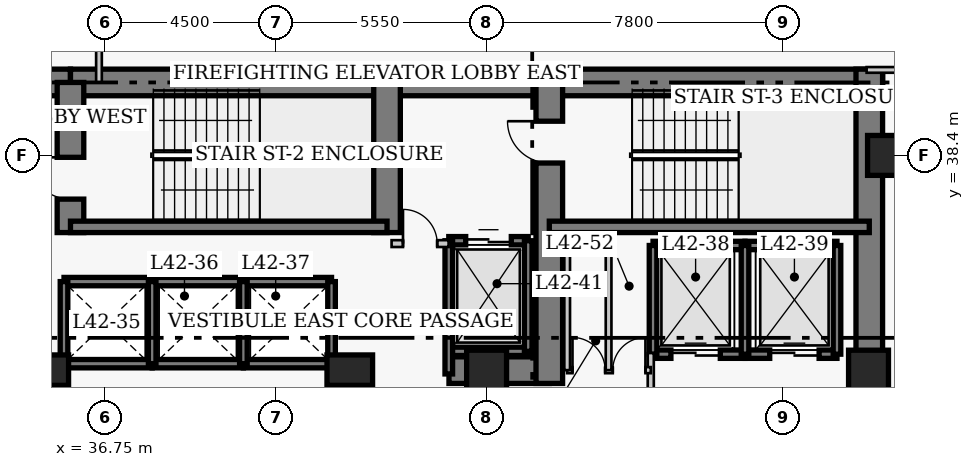
"""IFC4 building model, lengths in metres.
Left out: names, types, materials, properties, quantities, classifications, styles, units other than length and angle.
Written with IfcOpenShell. Run it as: python <this file> out.ifc"""

import sys

from ifc_helpers import new_model, si_unit, direction, frame, frame_2d, origin, origin_2d, place, context, subcontext, project, spatial, rectangle, extrude, element, fill, save


model = new_model("IFC4")
c1 = context("Model", 3, precision=1e-05, world=origin(), true_north=direction((0.0, 1.0)))
c2 = subcontext(c1, "Body", "Model", "MODEL_VIEW")
j1 = project(units=[si_unit("LENGTHUNIT", "METRE"), si_unit("PLANEANGLEUNIT", "RADIAN")], contexts=[c1])
p1 = place(None, origin())
s1 = spatial("IfcSite", under=j1, at=p1, CompositionType="ELEMENT")
p2 = place(p1, origin())
s2 = spatial("IfcBuilding", under=s1, at=p2, CompositionType="ELEMENT")
p3 = place(p2, frame((0.0, 0.0, 168.8)))
s3 = spatial("IfcBuildingStorey", under=s2, at=p3, CompositionType="ELEMENT", Elevation=168.8)
p4 = place(p3, frame((21.55, 40.32, 0.0), z_axis=(0.0, 0.0, 1.0), x_axis=(1.0, 0.0, 0.0)))
e1 = element("IfcWall", 1, at=p4, inside=s3, PredefinedType="SHEAR", context=c2, shape_type="SweptSolid", body=[
    extrude(rectangle(XDim=14.3, YDim=0.7, at=frame_2d((7.15, 0.0))), origin(), (0.0, 0.0, 1.0), 3.8),
])
p5 = place(p3, frame((35.85, 40.32, 0.0), z_axis=(0.0, 0.0, 1.0), x_axis=(1.0, 0.0, 0.0)))
e2 = element("IfcWall", 2, at=p5, inside=s3, PredefinedType="SHEAR", context=c2, shape_type="SweptSolid", body=[
    extrude(rectangle(XDim=12.6, YDim=0.7, at=frame_2d((6.3, 0.0))), origin(), (0.0, 0.0, 1.0), 3.8),
])
p6 = place(p3, frame((48.45, 40.32, 0.0), z_axis=(0.0, 0.0, 1.0), x_axis=(1.0, 0.0, 0.0)))
e3 = element("IfcWall", 3, at=p6, inside=s3, PredefinedType="SHEAR", context=c2, shape_type="SweptSolid", body=[
    extrude(rectangle(XDim=8.77, YDim=0.7, at=frame_2d((4.385, 0.0))), origin(), (0.0, 0.0, 1.0), 3.8),
])
p7 = place(p3, frame((56.87, 27.05, 0.0), z_axis=(0.0, 0.0, 1.0), x_axis=(0.0, 1.0, 0.0)))
e4 = element("IfcWall", 4, at=p7, inside=s3, PredefinedType="SHEAR", context=c2, shape_type="SweptSolid", body=[
    extrude(rectangle(XDim=13.62, YDim=0.7, at=frame_2d((6.81, 0.0))), origin(), (0.0, 0.0, 1.0), 3.8),
])
p8 = place(p3, frame((45.81, 32.75, 0.0), z_axis=(0.0, 0.0, 1.0), x_axis=(1.0, 0.0, 0.0)))
e5 = element("IfcWall", 5, at=p8, inside=s3, PredefinedType="SHEAR", context=c2, shape_type="SweptSolid", body=[
    extrude(rectangle(XDim=2.64, YDim=0.7, at=frame_2d((1.32, 0.0))), origin(), (0.0, 0.0, 1.0), 3.8),
])
p9 = place(p3, frame((35.85, 36.37, 0.0), z_axis=(0.0, 0.0, 1.0), x_axis=(0.0, 1.0, 0.0)))
e6 = element("IfcWall", 6, at=p9, inside=s3, PredefinedType="SHEAR", context=c2, shape_type="SweptSolid", body=[
    extrude(rectangle(XDim=3.95, YDim=0.7, at=frame_2d((1.975, 0.0))), origin(), (0.0, 0.0, 1.0), 3.8),
])
p10 = place(p9, frame((0.88, 0.0, 0.0)))
e7 = element("IfcOpeningElement", 7, at=p10, cuts=e6, PredefinedType="OPENING", context=c2, shape_type="SweptSolid", body=[
    extrude(rectangle(XDim=1.1, YDim=2.15, at=frame_2d((0.55, 1.075))), frame((0.0, 0.36, 0.0), z_axis=(0.0, -1.0, 0.0), x_axis=(1.0, 0.0, 0.0)), (0.0, 0.0, 1.0), 0.72),
])
p11 = place(p3, frame((44.18, 36.37, 0.0), z_axis=(0.0, 0.0, 1.0), x_axis=(0.0, 1.0, 0.0)))
e8 = element("IfcWall", 8, at=p11, inside=s3, PredefinedType="SHEAR", context=c2, shape_type="SweptSolid", body=[
    extrude(rectangle(XDim=3.95, YDim=0.7, at=frame_2d((1.975, 0.0))), origin(), (0.0, 0.0, 1.0), 3.8),
])
p12 = place(p3, frame((48.45, 32.4, 0.0), z_axis=(0.0, 0.0, 1.0), x_axis=(0.0, 1.0, 0.0)))
e9 = element("IfcWall", 9, at=p12, inside=s3, PredefinedType="SHEAR", context=c2, shape_type="SweptSolid", body=[
    extrude(rectangle(XDim=7.92, YDim=0.7, at=frame_2d((3.96, 0.0))), origin(), (0.0, 0.0, 1.0), 3.8),
])
p13 = place(p12, frame((5.8, 0.0, 0.0)))
e10 = element("IfcOpeningElement", 10, at=p13, cuts=e9, PredefinedType="OPENING", context=c2, shape_type="SweptSolid", body=[
    extrude(rectangle(XDim=1.1, YDim=2.15, at=frame_2d((0.55, 1.075))), frame((0.0, 0.36, 0.0), z_axis=(0.0, -1.0, 0.0), x_axis=(1.0, 0.0, 0.0)), (0.0, 0.0, 1.0), 0.72),
])
p14 = place(p3, frame((35.85, 36.52, 0.0), z_axis=(0.0, 0.0, 1.0), x_axis=(1.0, 0.0, 0.0)))
e11 = element("IfcWall", 11, at=p14, inside=s3, PredefinedType="SHEAR", context=c2, shape_type="SweptSolid", body=[
    extrude(rectangle(XDim=8.33, YDim=0.3, at=frame_2d((4.165, 0.0))), origin(), (0.0, 0.0, 1.0), 3.8),
])
p15 = place(p3, frame((48.45, 36.52, 0.0), z_axis=(0.0, 0.0, 1.0), x_axis=(1.0, 0.0, 0.0)))
e12 = element("IfcWall", 12, at=p15, inside=s3, PredefinedType="SHEAR", context=c2, shape_type="SweptSolid", body=[
    extrude(rectangle(XDim=8.42, YDim=0.3, at=frame_2d((4.21, 0.0))), origin(), (0.0, 0.0, 1.0), 3.8),
])
p16 = place(p3, frame((57.35, 38.4, 0.0), z_axis=(0.0, 0.0, 1.0), x_axis=(1.0, 0.0, 0.0)))
e13 = element("IfcColumn", 13, at=p16, inside=s3, PredefinedType="COLUMN", context=c2, shape_type="SweptSolid", body=[
    extrude(rectangle(XDim=1.05, YDim=1.05, at=origin_2d()), origin(), (0.0, 0.0, 1.0), 3.8),
])
for number, where, z_axis, x_axis in (
    (14, (35.2, 32.75, 0.0), (0.0, 0.0, 1.0), (1.0, 0.0, 0.0)),
    (15, (43.2, 32.75, 0.0), (0.0, 0.0, 1.0), (1.0, 0.0, 0.0)),
):
    element("IfcColumn", number, at=place(p3, frame(where, z_axis=z_axis, x_axis=x_axis)), inside=s3, PredefinedType="COLUMN", context=c2, shape_type="SweptSolid", body=[
        extrude(rectangle(XDim=1.2, YDim=0.8, at=origin_2d()), origin(), (0.0, 0.0, 1.0), 3.8),
    ])
for number, where, z_axis, x_axis in (
    (16, (46.8, 32.75, 0.0), (0.0, 0.0, 1.0), (1.0, 0.0, 0.0)),
    (17, (56.85, 32.75, 0.0), (0.0, 0.0, 1.0), (1.0, 0.0, 0.0)),
):
    element("IfcColumn", number, at=place(p3, frame(where, z_axis=z_axis, x_axis=x_axis)), inside=s3, PredefinedType="COLUMN", context=c2, shape_type="SweptSolid", body=[
        extrude(rectangle(XDim=1.05, YDim=1.05, at=origin_2d()), origin(), (0.0, 0.0, 1.0), 3.8),
    ])
for number, where, z_axis, x_axis in (
    (18, (35.68, 35.08, 0.0), (0.0, 0.0, 1.0), (1.0, 0.0, 0.0)),
    (19, (35.68, 32.92, 0.0), (0.0, 0.0, 1.0), (1.0, 0.0, 0.0)),
):
    element("IfcWall", number, at=place(p3, frame(where, z_axis=z_axis, x_axis=x_axis)), inside=s3, PredefinedType="SHEAR", context=c2, shape_type="SweptSolid", body=[
        extrude(rectangle(XDim=2.32, YDim=0.22, at=frame_2d((1.16, 0.0))), origin(), (0.0, 0.0, 1.0), 3.8),
    ])
p17 = place(p3, frame((35.68, 32.92, 0.0), z_axis=(0.0, 0.0, 1.0), x_axis=(0.0, 1.0, 0.0)))
e20 = element("IfcWall", 20, at=p17, inside=s3, PredefinedType="SHEAR", context=c2, shape_type="SweptSolid", body=[
    extrude(rectangle(XDim=2.16, YDim=0.2, at=frame_2d((1.08, 0.0))), origin(), (0.0, 0.0, 1.0), 3.8),
])
for number, where, z_axis, x_axis in (
    (21, (38.0, 35.08, 0.0), (0.0, 0.0, 1.0), (1.0, 0.0, 0.0)),
    (22, (38.0, 32.92, 0.0), (0.0, 0.0, 1.0), (1.0, 0.0, 0.0)),
):
    element("IfcWall", number, at=place(p3, frame(where, z_axis=z_axis, x_axis=x_axis)), inside=s3, PredefinedType="SHEAR", context=c2, shape_type="SweptSolid", body=[
        extrude(rectangle(XDim=2.4, YDim=0.22, at=frame_2d((1.2, 0.0))), origin(), (0.0, 0.0, 1.0), 3.8),
    ])
p18 = place(p3, frame((38.0, 32.92, 0.0), z_axis=(0.0, 0.0, 1.0), x_axis=(0.0, 1.0, 0.0)))
e23 = element("IfcWall", 23, at=p18, inside=s3, PredefinedType="SHEAR", context=c2, shape_type="SweptSolid", body=[
    extrude(rectangle(XDim=2.16, YDim=0.2, at=frame_2d((1.08, 0.0))), origin(), (0.0, 0.0, 1.0), 3.8),
])
for number, where, z_axis, x_axis in (
    (24, (40.4, 35.08, 0.0), (0.0, 0.0, 1.0), (1.0, 0.0, 0.0)),
    (25, (40.4, 32.92, 0.0), (0.0, 0.0, 1.0), (1.0, 0.0, 0.0)),
):
    element("IfcWall", number, at=place(p3, frame(where, z_axis=z_axis, x_axis=x_axis)), inside=s3, PredefinedType="SHEAR", context=c2, shape_type="SweptSolid", body=[
        extrude(rectangle(XDim=2.32, YDim=0.22, at=frame_2d((1.16, 0.0))), origin(), (0.0, 0.0, 1.0), 3.8),
    ])
for number, where, z_axis, x_axis in (
    (26, (40.4, 32.92, 0.0), (0.0, 0.0, 1.0), (0.0, 1.0, 0.0)),
    (27, (42.72, 32.92, 0.0), (0.0, 0.0, 1.0), (0.0, 1.0, 0.0)),
):
    element("IfcWall", number, at=place(p3, frame(where, z_axis=z_axis, x_axis=x_axis)), inside=s3, PredefinedType="SHEAR", context=c2, shape_type="SweptSolid", body=[
        extrude(rectangle(XDim=2.16, YDim=0.2, at=frame_2d((1.08, 0.0))), origin(), (0.0, 0.0, 1.0), 3.8),
    ])
p19 = place(p3, frame((51.18, 36.03, 0.0), z_axis=(0.0, 0.0, 1.0), x_axis=(1.0, 0.0, 0.0)))
e28 = element("IfcWall", 28, at=p19, inside=s3, PredefinedType="SHEAR", context=c2, shape_type="SweptSolid", body=[
    extrude(rectangle(XDim=2.42, YDim=0.22, at=frame_2d((1.21, 0.0))), origin(), (0.0, 0.0, 1.0), 3.8),
])
p20 = place(p3, frame((51.18, 33.17, 0.0), z_axis=(0.0, 0.0, 1.0), x_axis=(1.0, 0.0, 0.0)))
e29 = element("IfcWall", 29, at=p20, inside=s3, PredefinedType="SHEAR", context=c2, shape_type="SweptSolid", body=[
    extrude(rectangle(XDim=2.42, YDim=0.22, at=frame_2d((1.21, 0.0))), origin(), (0.0, 0.0, 1.0), 3.8),
])
p21 = place(p20, frame((0.47, 0.0, 0.0)))
e30 = element("IfcOpeningElement", 30, at=p21, cuts=e29, PredefinedType="OPENING", context=c2, shape_type="SweptSolid", body=[
    extrude(rectangle(XDim=1.3, YDim=2.15, at=frame_2d((0.65, 1.075))), frame((0.0, 0.12, 0.0), z_axis=(0.0, -1.0, 0.0), x_axis=(1.0, 0.0, 0.0)), (0.0, 0.0, 1.0), 0.24),
])
p22 = place(p3, frame((51.18, 33.17, 0.0), z_axis=(0.0, 0.0, 1.0), x_axis=(0.0, 1.0, 0.0)))
e31 = element("IfcWall", 31, at=p22, inside=s3, PredefinedType="SHEAR", context=c2, shape_type="SweptSolid", body=[
    extrude(rectangle(XDim=2.86, YDim=0.2, at=frame_2d((1.43, 0.0))), origin(), (0.0, 0.0, 1.0), 3.8),
])
p23 = place(p3, frame((53.6, 36.03, 0.0), z_axis=(0.0, 0.0, 1.0), x_axis=(1.0, 0.0, 0.0)))
e32 = element("IfcWall", 32, at=p23, inside=s3, PredefinedType="SHEAR", context=c2, shape_type="SweptSolid", body=[
    extrude(rectangle(XDim=2.42, YDim=0.22, at=frame_2d((1.21, 0.0))), origin(), (0.0, 0.0, 1.0), 3.8),
])
p24 = place(p3, frame((53.6, 33.17, 0.0), z_axis=(0.0, 0.0, 1.0), x_axis=(1.0, 0.0, 0.0)))
e33 = element("IfcWall", 33, at=p24, inside=s3, PredefinedType="SHEAR", context=c2, shape_type="SweptSolid", body=[
    extrude(rectangle(XDim=2.42, YDim=0.22, at=frame_2d((1.21, 0.0))), origin(), (0.0, 0.0, 1.0), 3.8),
])
p25 = place(p24, frame((0.65, 0.0, 0.0)))
e34 = element("IfcOpeningElement", 34, at=p25, cuts=e33, PredefinedType="OPENING", context=c2, shape_type="SweptSolid", body=[
    extrude(rectangle(XDim=1.3, YDim=2.15, at=frame_2d((0.65, 1.075))), frame((0.0, 0.12, 0.0), z_axis=(0.0, -1.0, 0.0), x_axis=(1.0, 0.0, 0.0)), (0.0, 0.0, 1.0), 0.24),
])
for number, where, z_axis, x_axis in (
    (35, (53.6, 33.17, 0.0), (0.0, 0.0, 1.0), (0.0, 1.0, 0.0)),
    (36, (56.02, 33.17, 0.0), (0.0, 0.0, 1.0), (0.0, 1.0, 0.0)),
):
    element("IfcWall", number, at=place(p3, frame(where, z_axis=z_axis, x_axis=x_axis)), inside=s3, PredefinedType="SHEAR", context=c2, shape_type="SweptSolid", body=[
        extrude(rectangle(XDim=2.86, YDim=0.2, at=frame_2d((1.43, 0.0))), origin(), (0.0, 0.0, 1.0), 3.8),
    ])
p26 = place(p3, frame((45.805, 36.155, 0.0), z_axis=(0.0, 0.0, 1.0), x_axis=(1.0, 0.0, 0.0)))
e37 = element("IfcWall", 37, at=p26, inside=s3, PredefinedType="SHEAR", context=c2, shape_type="SweptSolid", body=[
    extrude(rectangle(XDim=2.09, YDim=0.22, at=frame_2d((1.045, 0.0))), origin(), (0.0, 0.0, 1.0), 3.8),
])
p27 = place(p26, frame((0.445, 0.0, 0.0)))
e38 = element("IfcOpeningElement", 38, at=p27, cuts=e37, PredefinedType="OPENING", context=c2, shape_type="SweptSolid", body=[
    extrude(rectangle(XDim=1.2, YDim=2.15, at=frame_2d((0.6, 1.075))), frame((0.0, 0.12, 0.0), z_axis=(0.0, -1.0, 0.0), x_axis=(1.0, 0.0, 0.0)), (0.0, 0.0, 1.0), 0.24),
])
p28 = place(p3, frame((45.805, 33.245, 0.0), z_axis=(0.0, 0.0, 1.0), x_axis=(1.0, 0.0, 0.0)))
e39 = element("IfcWall", 39, at=p28, inside=s3, PredefinedType="SHEAR", context=c2, shape_type="SweptSolid", body=[
    extrude(rectangle(XDim=2.09, YDim=0.22, at=frame_2d((1.045, 0.0))), origin(), (0.0, 0.0, 1.0), 3.8),
])
p29 = place(p3, frame((45.805, 32.65, 0.0), z_axis=(0.0, 0.0, 1.0), x_axis=(0.0, 1.0, 0.0)))
e40 = element("IfcWall", 40, at=p29, inside=s3, PredefinedType="SHEAR", context=c2, shape_type="SweptSolid", body=[
    extrude(rectangle(XDim=3.505, YDim=0.2, at=frame_2d((1.752, 0.0))), origin(), (0.0, 0.0, 1.0), 3.8),
])
p30 = place(p3, frame((47.895, 33.245, 0.0), z_axis=(0.0, 0.0, 1.0), x_axis=(0.0, 1.0, 0.0)))
e41 = element("IfcWall", 41, at=p30, inside=s3, PredefinedType="SHEAR", context=c2, shape_type="SweptSolid", body=[
    extrude(rectangle(XDim=2.91, YDim=0.2, at=frame_2d((1.455, 0.0))), origin(), (0.0, 0.0, 1.0), 3.8),
])
p31 = place(p3, frame((44.3, 36.08, 0.0), z_axis=(0.0, 0.0, 1.0), x_axis=(1.0, 0.0, 0.0)))
e42 = element("IfcWall", 42, at=p31, inside=s3, PredefinedType="PARTITIONING", context=c2, shape_type="SweptSolid", body=[
    extrude(rectangle(XDim=1.5, YDim=0.18, at=frame_2d((0.75, 0.0))), origin(), (0.0, 0.0, 1.0), 3.55),
])
p32 = place(p31, frame((0.3, 0.0, 0.0)))
e43 = element("IfcOpeningElement", 43, at=p32, cuts=e42, PredefinedType="OPENING", context=c2, shape_type="SweptSolid", body=[
    extrude(rectangle(XDim=0.9, YDim=2.15, at=frame_2d((0.45, 1.075))), frame((0.0, 0.1, 0.0), z_axis=(0.0, -1.0, 0.0), x_axis=(1.0, 0.0, 0.0)), (0.0, 0.0, 1.0), 0.2),
])
p33 = place(p3, frame((51.12, 29.5, 0.0), z_axis=(0.0, 0.0, 1.0), x_axis=(0.0, 1.0, 0.0)))
e44 = element("IfcWall", 44, at=p33, inside=s3, PredefinedType="PARTITIONING", context=c2, shape_type="SweptSolid", body=[
    extrude(rectangle(XDim=3.7, YDim=0.16, at=frame_2d((1.85, 0.0))), origin(), (0.0, 0.0, 1.0), 3.55),
])
p34 = place(p33, frame((0.9, 0.0, 0.0)))
e45 = element("IfcOpeningElement", 45, at=p34, cuts=e44, PredefinedType="OPENING", context=c2, shape_type="SweptSolid", body=[
    extrude(rectangle(XDim=1.1, YDim=2.15, at=frame_2d((0.55, 1.075))), frame((0.0, 0.09, 0.0), z_axis=(0.0, -1.0, 0.0), x_axis=(1.0, 0.0, 0.0)), (0.0, 0.0, 1.0), 0.18),
])
p35 = place(p3, frame((48.92, 32.75, 0.0), z_axis=(0.0, 0.0, 1.0), x_axis=(1.0, 0.0, 0.0)))
e46 = element("IfcWall", 46, at=p35, inside=s3, PredefinedType="PARTITIONING", context=c2, shape_type="SweptSolid", body=[
    extrude(rectangle(XDim=2.2, YDim=0.16, at=frame_2d((1.1, 0.0))), origin(), (0.0, 0.0, 1.0), 3.55),
])
p36 = place(p35, frame((0.14, 0.0, 0.0)))
e47 = element("IfcOpeningElement", 47, at=p36, cuts=e46, PredefinedType="OPENING", context=c2, shape_type="SweptSolid", body=[
    extrude(rectangle(XDim=0.86, YDim=2.05, at=frame_2d((0.43, 1.025))), frame((0.0, 0.09, 0.0), z_axis=(0.0, -1.0, 0.0), x_axis=(1.0, 0.0, 0.0)), (0.0, 0.0, 1.0), 0.18),
])
p37 = place(p35, frame((1.2, 0.0, 0.0)))
e48 = element("IfcOpeningElement", 48, at=p37, cuts=e46, PredefinedType="OPENING", context=c2, shape_type="SweptSolid", body=[
    extrude(rectangle(XDim=0.86, YDim=2.05, at=frame_2d((0.43, 1.025))), frame((0.0, 0.09, 0.0), z_axis=(0.0, -1.0, 0.0), x_axis=(1.0, 0.0, 0.0)), (0.0, 0.0, 1.0), 0.18),
])
for number, where, z_axis, x_axis in (
    (49, (48.92, 32.75, 0.0), (0.0, 0.0, 1.0), (0.0, 1.0, 0.0)),
    (50, (50.01, 32.75, 0.0), (0.0, 0.0, 1.0), (0.0, 1.0, 0.0)),
):
    element("IfcWall", number, at=place(p3, frame(where, z_axis=z_axis, x_axis=x_axis)), inside=s3, PredefinedType="PARTITIONING", context=c2, shape_type="SweptSolid", body=[
        extrude(rectangle(XDim=3.62, YDim=0.15, at=frame_2d((1.81, 0.0))), origin(), (0.0, 0.0, 1.0), 3.55),
    ])
p38 = place(p3, frame((56.8, 40.65, 0.0), z_axis=(0.0, 0.0, 1.0), x_axis=(1.0, 0.0, 0.0)))
e51 = element("IfcWall", 51, at=p38, inside=s3, PredefinedType="PARTITIONING", context=c2, shape_type="SweptSolid", body=[
    extrude(rectangle(XDim=3.81, YDim=0.15, at=frame_2d((1.905, 0.0))), origin(), (0.0, 0.0, 1.0), 3.55),
])
p39 = place(p38, frame((2.2, 0.0, 0.0)))
e52 = element("IfcOpeningElement", 52, at=p39, cuts=e51, PredefinedType="OPENING", context=c2, shape_type="SweptSolid", body=[
    extrude(rectangle(XDim=1.0, YDim=2.15, at=frame_2d((0.5, 1.075))), frame((0.0, 0.085, 0.0), z_axis=(0.0, -1.0, 0.0), x_axis=(1.0, 0.0, 0.0)), (0.0, 0.0, 1.0), 0.17),
])
p40 = place(p3, frame((36.6, 40.32, 0.0), z_axis=(0.0, 0.0, 1.0), x_axis=(0.0, 1.0, 0.0)))
e53 = element("IfcWall", 53, at=p40, inside=s3, PredefinedType="PARTITIONING", context=c2, shape_type="SweptSolid", body=[
    extrude(rectangle(XDim=1.845, YDim=0.15, at=frame_2d((0.922, 0.0))), origin(), (0.0, 0.0, 1.0), 3.55),
])
p41 = place(p21, origin())
e54 = element("IfcDoor", 54, at=p41, inside=s3, OperationType="DOUBLE_DOOR_SLIDING", PredefinedType="DOOR", context=c2, shape_type="SweptSolid", body=[
    extrude(rectangle(XDim=1.3, YDim=2.15, at=frame_2d((0.65, 1.075))), frame((0.0, 0.025, 0.0), z_axis=(0.0, -1.0, 0.0), x_axis=(1.0, 0.0, 0.0)), (0.0, 0.0, 1.0), 0.05),
])
fill(e30, e54)
p42 = place(p25, origin())
e55 = element("IfcDoor", 55, at=p42, inside=s3, OperationType="DOUBLE_DOOR_SLIDING", PredefinedType="DOOR", context=c2, shape_type="SweptSolid", body=[
    extrude(rectangle(XDim=1.3, YDim=2.15, at=frame_2d((0.65, 1.075))), frame((0.0, 0.025, 0.0), z_axis=(0.0, -1.0, 0.0), x_axis=(1.0, 0.0, 0.0)), (0.0, 0.0, 1.0), 0.05),
])
fill(e34, e55)
p43 = place(p27, origin())
e56 = element("IfcDoor", 56, at=p43, inside=s3, OperationType="DOUBLE_DOOR_SLIDING", PredefinedType="DOOR", context=c2, shape_type="SweptSolid", body=[
    extrude(rectangle(XDim=1.2, YDim=2.15, at=frame_2d((0.6, 1.075))), frame((0.0, 0.025, 0.0), z_axis=(0.0, -1.0, 0.0), x_axis=(1.0, 0.0, 0.0)), (0.0, 0.0, 1.0), 0.05),
])
fill(e38, e56)
p44 = place(p32, origin())
e57 = element("IfcDoor", 57, at=p44, inside=s3, OperationType="SINGLE_SWING_LEFT", PredefinedType="DOOR", context=c2, shape_type="SweptSolid", body=[
    extrude(rectangle(XDim=0.9, YDim=2.15, at=frame_2d((0.45, 1.075))), frame((0.0, 0.025, 0.0), z_axis=(0.0, -1.0, 0.0), x_axis=(1.0, 0.0, 0.0)), (0.0, 0.0, 1.0), 0.05),
])
fill(e43, e57)
p45 = place(p36, origin())
e58 = element("IfcDoor", 58, at=p45, inside=s3, OperationType="SINGLE_SWING_LEFT", PredefinedType="DOOR", context=c2, shape_type="SweptSolid", body=[
    extrude(rectangle(XDim=0.86, YDim=2.05, at=frame_2d((0.43, 1.025))), frame((0.0, 0.025, 0.0), z_axis=(0.0, -1.0, 0.0), x_axis=(1.0, 0.0, 0.0)), (0.0, 0.0, 1.0), 0.05),
])
fill(e47, e58)
p46 = place(p37, origin())
e59 = element("IfcDoor", 59, at=p46, inside=s3, OperationType="SINGLE_SWING_RIGHT", PredefinedType="DOOR", context=c2, shape_type="SweptSolid", body=[
    extrude(rectangle(XDim=0.86, YDim=2.05, at=frame_2d((0.43, 1.025))), frame((0.0, 0.025, 0.0), z_axis=(0.0, -1.0, 0.0), x_axis=(1.0, 0.0, 0.0)), (0.0, 0.0, 1.0), 0.05),
])
fill(e48, e59)
p47 = place(p10, origin())
e60 = element("IfcDoor", 60, at=p47, inside=s3, OperationType="SINGLE_SWING_RIGHT", PredefinedType="DOOR", context=c2, shape_type="SweptSolid", body=[
    extrude(rectangle(XDim=1.1, YDim=2.15, at=frame_2d((0.55, 1.075))), frame((0.0, 0.025, 0.0), z_axis=(0.0, -1.0, 0.0), x_axis=(1.0, 0.0, 0.0)), (0.0, 0.0, 1.0), 0.05),
])
fill(e7, e60)
p48 = place(p13, origin())
e61 = element("IfcDoor", 61, at=p48, inside=s3, OperationType="SINGLE_SWING_RIGHT", PredefinedType="DOOR", context=c2, shape_type="SweptSolid", body=[
    extrude(rectangle(XDim=1.1, YDim=2.15, at=frame_2d((0.55, 1.075))), frame((0.0, 0.025, 0.0), z_axis=(0.0, -1.0, 0.0), x_axis=(1.0, 0.0, 0.0)), (0.0, 0.0, 1.0), 0.05),
])
fill(e10, e61)
save(model, sys.argv[1])
